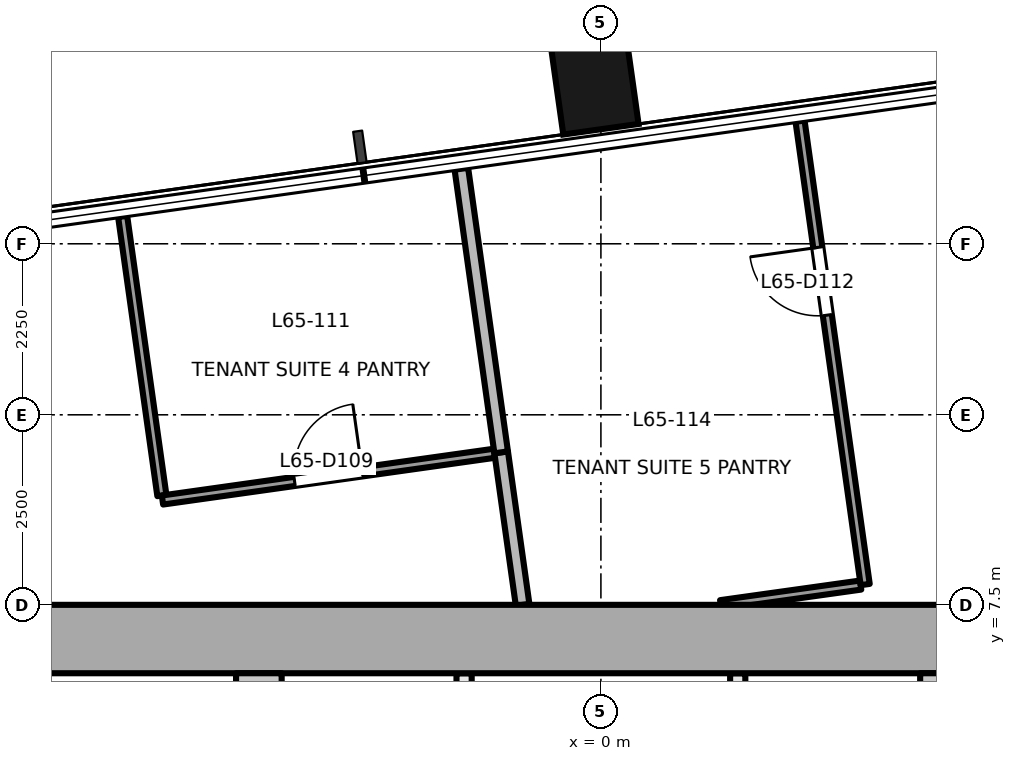
"""IFC4 building model, lengths in metres.
Left out: names, types, materials, properties, quantities, classifications, styles, units other than length and angle.
Written with IfcOpenShell. Run it as: python <this file> out.ifc"""

import sys

from ifc_helpers import new_model, si_unit, direction, frame, frame_2d, origin, origin_2d, place, context, subcontext, project, spatial, rectangle, extrude, element, fill, save


model = new_model("IFC4")
c1 = context("Model", 3, precision=1e-05, world=origin(), true_north=direction((0.0, 1.0)))
c2 = subcontext(c1, "Body", "Model", "MODEL_VIEW")
j1 = project(units=[si_unit("LENGTHUNIT", "METRE"), si_unit("PLANEANGLEUNIT", "RADIAN")], contexts=[c1])
p1 = place(None, origin())
s1 = spatial("IfcSite", under=j1, at=p1, CompositionType="ELEMENT")
p2 = place(p1, origin())
s2 = spatial("IfcBuilding", under=s1, at=p2, CompositionType="ELEMENT")
p3 = place(p2, frame((0.0, 0.0, 282.4)))
s3 = spatial("IfcBuildingStorey", under=s2, at=p3, CompositionType="ELEMENT", Elevation=282.4)
p4 = place(p3, frame((-0.125, 14.648, -0.2), z_axis=(0.0, 0.0, 1.0), x_axis=(0.990265639562, 0.139190384377, 0.0)))
e1 = element("IfcColumn", 1, at=p4, inside=s3, PredefinedType="COLUMN", context=c2, shape_type="SweptSolid", body=[
    extrude(rectangle(XDim=1.0, YDim=1.8, at=origin_2d()), origin(), (0.0, 0.0, 1.0), 3.9),
])
p5 = place(p3, frame((-18.0, 7.05, -0.2), z_axis=(0.0, 0.0, 1.0), x_axis=(1.0, 0.0, 0.0)))
e2 = element("IfcWall", 2, at=p5, inside=s3, PredefinedType="SHEAR", context=c2, shape_type="SweptSolid", body=[
    extrude(rectangle(XDim=36.0, YDim=0.9, at=frame_2d((18.0, 0.0))), origin(), (0.0, 0.0, 1.0), 3.9),
])
for number, where, z_axis, x_axis in (
    (3, (-4.5, -6.6, -0.2), (0.0, 0.0, 1.0), (0.0, 1.0, 0.0)),
    (4, (4.5, -6.6, -0.2), (0.0, 0.0, 1.0), (0.0, 1.0, 0.0)),
):
    element("IfcWall", number, at=place(p3, frame(where, z_axis=z_axis, x_axis=x_axis)), inside=s3, PredefinedType="SHEAR", context=c2, shape_type="SweptSolid", body=[
        extrude(rectangle(XDim=13.2, YDim=0.6, at=frame_2d((6.6, 0.0))), origin(), (0.0, 0.0, 1.0), 3.9),
    ])
p6 = place(p3, frame((-1.8, -6.6, 0.0), z_axis=(0.0, 0.0, 1.0), x_axis=(0.0, 1.0, 0.0)))
e5 = element("IfcWall", 5, at=p6, inside=s3, PredefinedType="PARTITIONING", context=c2, shape_type="SweptSolid", body=[
    extrude(rectangle(XDim=13.2, YDim=0.2, at=frame_2d((6.6, 0.0))), origin(), (0.0, 0.0, 1.0), 3.7),
])
p7 = place(p6, frame((0.55, 0.0, 0.0)))
e6 = element("IfcOpeningElement", 6, at=p7, cuts=e5, PredefinedType="OPENING", context=c2, shape_type="SweptSolid", body=[
    extrude(rectangle(XDim=0.9, YDim=2.1, at=frame_2d((0.45, 1.05))), frame((0.0, 0.111, 0.0), z_axis=(0.0, -1.0, 0.0), x_axis=(1.0, 0.0, 0.0)), (0.0, 0.0, 1.0), 0.221),
])
p8 = place(p6, frame((2.9, 0.0, 0.0)))
e7 = element("IfcOpeningElement", 7, at=p8, cuts=e5, PredefinedType="OPENING", context=c2, shape_type="SweptSolid", body=[
    extrude(rectangle(XDim=1.2, YDim=2.1, at=frame_2d((0.6, 1.05))), frame((0.0, 0.111, 0.0), z_axis=(0.0, -1.0, 0.0), x_axis=(1.0, 0.0, 0.0)), (0.0, 0.0, 1.0), 0.221),
])
p9 = place(p6, frame((5.7, 0.0, 0.0)))
e8 = element("IfcOpeningElement", 8, at=p9, cuts=e5, PredefinedType="OPENING", context=c2, shape_type="SweptSolid", body=[
    extrude(rectangle(XDim=1.2, YDim=2.1, at=frame_2d((0.6, 1.05))), frame((0.0, 0.111, 0.0), z_axis=(0.0, -1.0, 0.0), x_axis=(1.0, 0.0, 0.0)), (0.0, 0.0, 1.0), 0.221),
])
p10 = place(p6, frame((8.5, 0.0, 0.0)))
e9 = element("IfcOpeningElement", 9, at=p10, cuts=e5, PredefinedType="OPENING", context=c2, shape_type="SweptSolid", body=[
    extrude(rectangle(XDim=1.2, YDim=2.1, at=frame_2d((0.6, 1.05))), frame((0.0, 0.111, 0.0), z_axis=(0.0, -1.0, 0.0), x_axis=(1.0, 0.0, 0.0)), (0.0, 0.0, 1.0), 0.221),
])
p11 = place(p6, frame((11.3, 0.0, 0.0)))
e10 = element("IfcOpeningElement", 10, at=p11, cuts=e5, PredefinedType="OPENING", context=c2, shape_type="SweptSolid", body=[
    extrude(rectangle(XDim=1.2, YDim=2.1, at=frame_2d((0.6, 1.05))), frame((0.0, 0.111, 0.0), z_axis=(0.0, -1.0, 0.0), x_axis=(1.0, 0.0, 0.0)), (0.0, 0.0, 1.0), 0.221),
])
p12 = place(p3, frame((1.8, -6.6, 0.0), z_axis=(0.0, 0.0, 1.0), x_axis=(0.0, 1.0, 0.0)))
e11 = element("IfcWall", 11, at=p12, inside=s3, PredefinedType="PARTITIONING", context=c2, shape_type="SweptSolid", body=[
    extrude(rectangle(XDim=13.2, YDim=0.2, at=frame_2d((6.6, 0.0))), origin(), (0.0, 0.0, 1.0), 3.7),
])
p13 = place(p12, frame((0.55, 0.0, 0.0)))
e12 = element("IfcOpeningElement", 12, at=p13, cuts=e11, PredefinedType="OPENING", context=c2, shape_type="SweptSolid", body=[
    extrude(rectangle(XDim=0.9, YDim=2.1, at=frame_2d((0.45, 1.05))), frame((0.0, 0.111, 0.0), z_axis=(0.0, -1.0, 0.0), x_axis=(1.0, 0.0, 0.0)), (0.0, 0.0, 1.0), 0.221),
])
p14 = place(p12, frame((2.9, 0.0, 0.0)))
e13 = element("IfcOpeningElement", 13, at=p14, cuts=e11, PredefinedType="OPENING", context=c2, shape_type="SweptSolid", body=[
    extrude(rectangle(XDim=1.2, YDim=2.1, at=frame_2d((0.6, 1.05))), frame((0.0, 0.111, 0.0), z_axis=(0.0, -1.0, 0.0), x_axis=(1.0, 0.0, 0.0)), (0.0, 0.0, 1.0), 0.221),
])
p15 = place(p12, frame((5.7, 0.0, 0.0)))
e14 = element("IfcOpeningElement", 14, at=p15, cuts=e11, PredefinedType="OPENING", context=c2, shape_type="SweptSolid", body=[
    extrude(rectangle(XDim=1.2, YDim=2.1, at=frame_2d((0.6, 1.05))), frame((0.0, 0.111, 0.0), z_axis=(0.0, -1.0, 0.0), x_axis=(1.0, 0.0, 0.0)), (0.0, 0.0, 1.0), 0.221),
])
p16 = place(p12, frame((8.5, 0.0, 0.0)))
e15 = element("IfcOpeningElement", 15, at=p16, cuts=e11, PredefinedType="OPENING", context=c2, shape_type="SweptSolid", body=[
    extrude(rectangle(XDim=1.2, YDim=2.1, at=frame_2d((0.6, 1.05))), frame((0.0, 0.111, 0.0), z_axis=(0.0, -1.0, 0.0), x_axis=(1.0, 0.0, 0.0)), (0.0, 0.0, 1.0), 0.221),
])
p17 = place(p12, frame((11.3, 0.0, 0.0)))
e16 = element("IfcOpeningElement", 16, at=p17, cuts=e11, PredefinedType="OPENING", context=c2, shape_type="SweptSolid", body=[
    extrude(rectangle(XDim=1.2, YDim=2.1, at=frame_2d((0.6, 1.05))), frame((0.0, 0.111, 0.0), z_axis=(0.0, -1.0, 0.0), x_axis=(1.0, 0.0, 0.0)), (0.0, 0.0, 1.0), 0.221),
])
p18 = place(p3, frame((-6.292, 12.61, 0.0), z_axis=(0.0, 0.0, 1.0), x_axis=(0.13918119099, -0.990266931728, 0.0)))
e17 = element("IfcWall", 17, at=p18, inside=s3, PredefinedType="PARTITIONING", context=c2, shape_type="SweptSolid", body=[
    extrude(rectangle(XDim=3.708, YDim=0.12, at=frame_2d((1.854, 0.0))), origin(), (0.0, 0.0, 1.0), 3.7),
])
p19 = place(p3, frame((-5.768, 8.879, 0.0), z_axis=(0.0, 0.0, 1.0), x_axis=(0.990229842837, 0.139444821898, 0.0)))
e18 = element("IfcWall", 18, at=p19, inside=s3, PredefinedType="PARTITIONING", context=c2, shape_type="SweptSolid", body=[
    extrude(rectangle(XDim=4.41, YDim=0.12, at=frame_2d((2.205, 0.0))), origin(), (0.0, 0.0, 1.0), 3.4),
])
p20 = place(p19, frame((1.755, 0.0, 0.0)))
e19 = element("IfcOpeningElement", 19, at=p20, cuts=e18, PredefinedType="OPENING", context=c2, shape_type="SweptSolid", body=[
    extrude(rectangle(XDim=0.9, YDim=2.1, at=frame_2d((0.45, 1.05))), frame((0.0, 0.071, 0.0), z_axis=(0.0, -1.0, 0.0), x_axis=(1.0, 0.0, 0.0)), (0.0, 0.0, 1.0), 0.141),
])
p21 = place(p3, frame((-1.312, 9.506, 0.0), z_axis=(0.0, 0.0, 1.0), x_axis=(0.139193896019, -0.990265145964, 0.0)))
e20 = element("IfcWall", 20, at=p21, inside=s3, PredefinedType="PARTITIONING", context=c2, shape_type="SweptSolid", body=[
    extrude(rectangle(XDim=2.026, YDim=0.18, at=frame_2d((1.013, 0.0))), origin(), (0.0, 0.0, 1.0), 3.7),
])
p22 = place(p3, frame((-1.836, 13.237, 0.0), z_axis=(0.0, 0.0, 1.0), x_axis=(0.139062210866, -0.990283646997, 0.0)))
e21 = element("IfcWall", 21, at=p22, inside=s3, PredefinedType="PARTITIONING", context=c2, shape_type="SweptSolid", body=[
    extrude(rectangle(XDim=3.768, YDim=0.18, at=frame_2d((1.884, 0.0))), origin(), (0.0, 0.0, 1.0), 3.7),
])
p23 = place(p3, frame((1.576, 7.502, 0.0), z_axis=(0.0, 0.0, 1.0), x_axis=(0.990319013032, 0.138810130855, 0.0)))
e22 = element("IfcWall", 22, at=p23, inside=s3, PredefinedType="PARTITIONING", context=c2, shape_type="SweptSolid", body=[
    extrude(rectangle(XDim=1.859, YDim=0.12, at=frame_2d((0.93, 0.0))), origin(), (0.0, 0.0, 1.0), 3.7),
])
p24 = place(p3, frame((3.477, 7.767, 0.0), z_axis=(0.0, 0.0, 1.0), x_axis=(-0.13920561026, 0.990263499313, 0.0)))
e23 = element("IfcWall", 23, at=p24, inside=s3, PredefinedType="PARTITIONING", context=c2, shape_type="SweptSolid", body=[
    extrude(rectangle(XDim=6.156, YDim=0.12, at=frame_2d((3.078, 0.0))), origin(), (0.0, 0.0, 1.0), 3.7),
])
p25 = place(p24, frame((3.579, 0.0, 0.0)))
e24 = element("IfcOpeningElement", 24, at=p25, cuts=e23, PredefinedType="OPENING", context=c2, shape_type="SweptSolid", body=[
    extrude(rectangle(XDim=0.9, YDim=2.1, at=frame_2d((0.45, 1.05))), frame((0.0, 0.071, 0.0), z_axis=(0.0, -1.0, 0.0), x_axis=(1.0, 0.0, 0.0)), (0.0, 0.0, 1.0), 0.141),
])
p26 = place(p20, origin())
e25 = element("IfcDoor", 25, at=p26, inside=s3, OperationType="SINGLE_SWING_RIGHT", PredefinedType="DOOR", context=c2, shape_type="SweptSolid", body=[
    extrude(rectangle(XDim=0.9, YDim=2.1, at=frame_2d((0.45, 1.05))), frame((0.0, 0.025, 0.0), z_axis=(0.0, -1.0, 0.0), x_axis=(1.0, 0.0, 0.0)), (0.0, 0.0, 1.0), 0.05),
])
fill(e19, e25)
p27 = place(p25, origin())
e26 = element("IfcDoor", 26, at=p27, inside=s3, OperationType="SINGLE_SWING_RIGHT", PredefinedType="DOOR", context=c2, shape_type="SweptSolid", body=[
    extrude(rectangle(XDim=0.9, YDim=2.1, at=frame_2d((0.45, 1.05))), frame((0.0, 0.025, 0.0), z_axis=(0.0, -1.0, 0.0), x_axis=(1.0, 0.0, 0.0)), (0.0, 0.0, 1.0), 0.05),
])
fill(e24, e26)
save(model, sys.argv[1])
